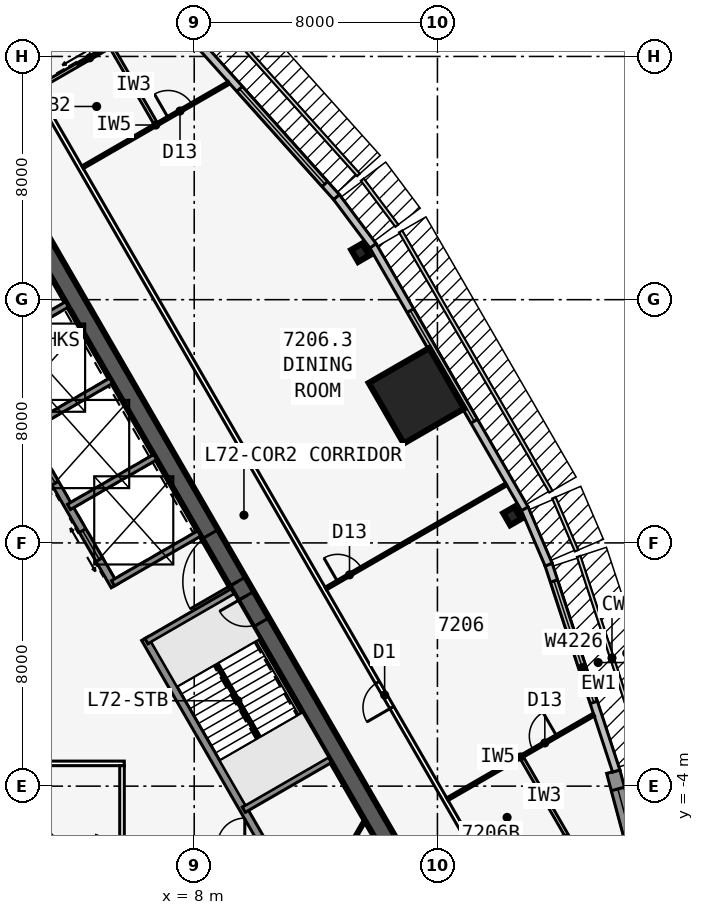
"""IFC4 building model, lengths in metres.
Left out: names, types, materials, properties, quantities, classifications, styles, units other than length and angle.
Written with IfcOpenShell. Run it as: python <this file> out.ifc"""

import sys

from ifc_helpers import new_model, si_unit, direction, frame, frame_2d, origin, origin_2d, place, context, subcontext, project, spatial, rectangle, i_section, extrude, element, fill, save


model = new_model("IFC4")
c1 = context("Model", 3, precision=1e-05, world=origin(), true_north=direction((0.0, 1.0)))
c2 = subcontext(c1, "Body", "Model", "MODEL_VIEW")
j1 = project(units=[si_unit("LENGTHUNIT", "METRE"), si_unit("PLANEANGLEUNIT", "RADIAN")], contexts=[c1])
p1 = place(None, origin())
s1 = spatial("IfcSite", under=j1, at=p1, CompositionType="ELEMENT")
p2 = place(p1, origin())
s2 = spatial("IfcBuilding", under=s1, at=p2, CompositionType="ELEMENT")
p3 = place(p2, frame((0.0, 0.0, 271.7)))
s3 = spatial("IfcBuildingStorey", under=s2, at=p3, CompositionType="ELEMENT", Elevation=271.7)
p4 = place(p3, frame((16.5, -9.526, 0.0), z_axis=(0.0, 0.0, 1.0), x_axis=(-0.499999749417, 0.866025548458, 0.0)))
e1 = element("IfcWall", 1, at=p4, inside=s3, PredefinedType="SHEAR", context=c2, shape_type="SweptSolid", body=[
    extrude(rectangle(XDim=33.0, YDim=0.6, at=frame_2d((16.5, 0.0))), origin(), (0.0, 0.0, 1.0), 3.6),
])
p5 = place(p4, frame((14.15, 0.0, 0.0)))
e2 = element("IfcOpeningElement", 2, at=p5, cuts=e1, PredefinedType="OPENING", context=c2, shape_type="SweptSolid", body=[
    extrude(rectangle(XDim=1.8, YDim=2.13, at=frame_2d((0.9, 1.065))), frame((0.0, 0.31, 0.0), z_axis=(0.0, -1.0, 0.0), x_axis=(1.0, 0.0, 0.0)), (0.0, 0.0, 1.0), 0.62),
])
p6 = place(p4, frame((12.6, 0.0, 0.0)))
e3 = element("IfcOpeningElement", 3, at=p6, cuts=e1, PredefinedType="OPENING", context=c2, shape_type="SweptSolid", body=[
    extrude(rectangle(XDim=1.0, YDim=2.13, at=frame_2d((0.5, 1.065))), frame((0.0, 0.31, 0.0), z_axis=(0.0, -1.0, 0.0), x_axis=(1.0, 0.0, 0.0)), (0.0, 0.0, 1.0), 0.62),
])
p7 = place(p3, frame((10.245, -5.843, 0.0), z_axis=(0.0, 0.0, 1.0), x_axis=(-0.499993009313, 0.866029439822, 0.0)))
e4 = element("IfcWall", 4, at=p7, inside=s3, PredefinedType="SOLIDWALL", context=c2, shape_type="SweptSolid", body=[
    extrude(rectangle(XDim=7.733, YDim=0.25, at=frame_2d((3.866, 0.0))), origin(), (0.0, 0.0, 1.0), 3.35),
])
p8 = place(p3, frame((5.379, 2.586, 0.0), z_axis=(0.0, 0.0, 1.0), x_axis=(-0.500001375892, 0.866024609411, 0.0)))
e5 = element("IfcWall", 5, at=p8, inside=s3, PredefinedType="SOLIDWALL", context=c2, shape_type="SweptSolid", body=[
    extrude(rectangle(XDim=10.633, YDim=0.25, at=frame_2d((5.316, 0.0))), origin(), (0.0, 0.0, 1.0), 3.35),
])
p9 = place(p8, frame((9.164, 0.0, 0.0)))
e6 = element("IfcOpeningElement", 6, at=p9, cuts=e5, PredefinedType="OPENING", context=c2, shape_type="SweptSolid", body=[
    extrude(rectangle(XDim=0.9, YDim=2.13, at=frame_2d((0.45, 1.065))), frame((0.0, 0.135, 0.0), z_axis=(0.0, -1.0, 0.0), x_axis=(1.0, 0.0, 0.0)), (0.0, 0.0, 1.0), 0.27),
])
p10 = place(p8, frame((1.0, 0.0, 0.0)))
e7 = element("IfcOpeningElement", 7, at=p10, cuts=e5, PredefinedType="OPENING", context=c2, shape_type="SweptSolid", body=[
    extrude(rectangle(XDim=1.1, YDim=2.13, at=frame_2d((0.55, 1.065))), frame((0.0, 0.135, 0.0), z_axis=(0.0, -1.0, 0.0), x_axis=(1.0, 0.0, 0.0)), (0.0, 0.0, 1.0), 0.27),
])
p11 = place(p8, frame((3.9, 0.0, 0.0)))
e8 = element("IfcOpeningElement", 8, at=p11, cuts=e5, PredefinedType="OPENING", context=c2, shape_type="SweptSolid", body=[
    extrude(rectangle(XDim=1.1, YDim=2.13, at=frame_2d((0.55, 1.065))), frame((0.0, 0.135, 0.0), z_axis=(0.0, -1.0, 0.0), x_axis=(1.0, 0.0, 0.0)), (0.0, 0.0, 1.0), 0.27),
])
p12 = place(p8, frame((6.8, 0.0, 0.0)))
e9 = element("IfcOpeningElement", 9, at=p12, cuts=e5, PredefinedType="OPENING", context=c2, shape_type="SweptSolid", body=[
    extrude(rectangle(XDim=1.1, YDim=2.13, at=frame_2d((0.55, 1.065))), frame((0.0, 0.135, 0.0), z_axis=(0.0, -1.0, 0.0), x_axis=(1.0, 0.0, 0.0)), (0.0, 0.0, 1.0), 0.27),
])
p13 = place(p3, frame((9.629, -4.775, 0.0), z_axis=(0.0, 0.0, 1.0), x_axis=(0.865995643347, 0.500051543047, 0.0)))
e10 = element("IfcWall", 10, at=p13, inside=s3, PredefinedType="SOLIDWALL", context=c2, shape_type="SweptSolid", body=[
    extrude(rectangle(XDim=3.275, YDim=0.2, at=frame_2d((1.638, 0.0))), origin(), (0.0, 0.0, 1.0), 3.35),
])
for number, where, z_axis, x_axis in (
    (11, (6.429, 0.767, 0.0), (0.0, 0.0, 1.0), (0.866, 0.5, 0.0)),
    (12, (5.329, 2.673, 0.0), (0.0, 0.0, 1.0), (0.866, 0.5, 0.0)),
    (13, (3.879, 5.184, 0.0), (0.0, 0.0, 1.0), (0.866, 0.5, 0.0)),
    (14, (2.429, 7.696, 0.0), (0.0, 0.0, 1.0), (0.866, 0.5, 0.0)),
    (15, (0.979, 10.207, 0.0), (0.0, 0.0, 1.0), (0.866, 0.5, 0.0)),
):
    element("IfcWall", number, at=place(p3, frame(where, z_axis=z_axis, x_axis=x_axis)), inside=s3, PredefinedType="SOLIDWALL", context=c2, shape_type="SweptSolid", body=[
        extrude(rectangle(XDim=3.275, YDim=0.2, at=frame_2d((1.637, 0.0))), origin(), (0.0, 0.0, 1.0), 3.35),
    ])
for number, where, z_axis, x_axis in (
    (16, (18.461, 4.885, 0.0), (0.0, 0.0, 1.0), (0.866, 0.5, 0.0)),
    (17, (13.461, 13.545, 0.0), (0.0, 0.0, 1.0), (0.866, 0.5, 0.0)),
):
    element("IfcColumn", number, at=place(p3, frame(where, z_axis=z_axis, x_axis=x_axis)), inside=s3, PredefinedType="COLUMN", context=c2, shape_type="SweptSolid", body=[
        extrude(i_section(OverallWidth=0.419, OverallDepth=0.455, WebThickness=0.042, FlangeThickness=0.068, at=origin_2d()), origin(), (0.0, 0.0, 1.0), 3.6),
    ])
p14 = place(p3, frame((15.312, 8.84, 0.0), z_axis=(0.0, 0.0, 1.0), x_axis=(0.866025403784, 0.5, 0.0)))
e18 = element("IfcColumn", 18, at=p14, inside=s3, PredefinedType="COLUMN", context=c2, shape_type="SweptSolid", body=[
    extrude(rectangle(XDim=2.3, YDim=2.3, at=origin_2d()), origin(), (0.0, 0.0, 1.0), 3.6),
])
p15 = place(p3, frame((23.02, -8.141, 0.0), z_axis=(0.0, 0.0, 1.0), x_axis=(-0.25880328844, 0.965930048136, 0.0)))
e19 = element("IfcWall", 19, at=p15, inside=s3, PredefinedType="SOLIDWALL", context=c2, shape_type="SweptSolid", body=[
    extrude(rectangle(XDim=4.782, YDim=0.45, at=frame_2d((2.391, 0.0))), origin(), (0.0, 0.0, 1.0), 3.35),
])
p16 = place(p15, frame((0.591, 0.0, 0.45)))
e20 = element("IfcOpeningElement", 20, at=p16, cuts=e19, PredefinedType="OPENING", context=c2, shape_type="SweptSolid", body=[
    extrude(rectangle(XDim=3.6, YDim=2.6, at=frame_2d((1.8, 1.3))), frame((0.0, 0.235, 0.0), z_axis=(0.0, -1.0, 0.0), x_axis=(1.0, 0.0, 0.0)), (0.0, 0.0, 1.0), 0.47),
])
p17 = place(p3, frame((21.881, -3.503, 0.0), z_axis=(0.0, 0.0, 1.0), x_axis=(-0.311328857048, 0.95030223759, 0.0)))
e21 = element("IfcWall", 21, at=p17, inside=s3, PredefinedType="STANDARD", context=c2, shape_type="SweptSolid", body=[
    extrude(rectangle(XDim=7.153, YDim=0.25, at=frame_2d((3.576, 0.0))), origin(), (0.0, 0.0, 1.0), 3.35),
])
p18 = place(p17, frame((2.376, 0.0, 0.45)))
e22 = element("IfcOpeningElement", 22, at=p18, cuts=e21, PredefinedType="OPENING", context=c2, shape_type="SweptSolid", body=[
    extrude(rectangle(XDim=4.2, YDim=2.6, at=frame_2d((2.1, 1.3))), frame((0.0, 0.135, 0.0), z_axis=(0.0, -1.0, 0.0), x_axis=(1.0, 0.0, 0.0)), (0.0, 0.0, 1.0), 0.27),
])
p19 = place(p3, frame((19.658, 3.284, 0.0), z_axis=(0.0, 0.0, 1.0), x_axis=(-0.393290226175, 0.91941437774, 0.0)))
e23 = element("IfcWall", 23, at=p19, inside=s3, PredefinedType="STANDARD", context=c2, shape_type="SweptSolid", body=[
    extrude(rectangle(XDim=2.014, YDim=0.25, at=frame_2d((1.007, 0.0))), origin(), (0.0, 0.0, 1.0), 3.35),
])
p20 = place(p3, frame((18.873, 5.123, 0.0), z_axis=(0.0, 0.0, 1.0), x_axis=(-0.499993662806, 0.866029062534, 0.0)))
e24 = element("IfcWall", 24, at=p20, inside=s3, PredefinedType="STANDARD", context=c2, shape_type="SweptSolid", body=[
    extrude(rectangle(XDim=10.0, YDim=0.25, at=frame_2d((5.0, 0.0))), origin(), (0.0, 0.0, 1.0), 3.35),
])
p21 = place(p20, frame((3.325, 0.0, 0.45)))
e25 = element("IfcOpeningElement", 25, at=p21, cuts=e24, PredefinedType="OPENING", context=c2, shape_type="SweptSolid", body=[
    extrude(rectangle(XDim=4.2, YDim=2.6, at=frame_2d((2.1, 1.3))), frame((0.0, 0.135, 0.0), z_axis=(0.0, -1.0, 0.0), x_axis=(1.0, 0.0, 0.0)), (0.0, 0.0, 1.0), 0.27),
])
p22 = place(p3, frame((13.881, 13.771, 0.0), z_axis=(0.0, 0.0, 1.0), x_axis=(-0.599650843534, 0.800261748335, 0.0)))
e26 = element("IfcWall", 26, at=p22, inside=s3, PredefinedType="STANDARD", context=c2, shape_type="SweptSolid", body=[
    extrude(rectangle(XDim=2.014, YDim=0.25, at=frame_2d((1.007, 0.0))), origin(), (0.0, 0.0, 1.0), 3.35),
])
p23 = place(p3, frame((12.68, 15.374, 0.0), z_axis=(0.0, 0.0, 1.0), x_axis=(-0.667303550892, 0.744785855778, 0.0)))
e27 = element("IfcWall", 27, at=p23, inside=s3, PredefinedType="STANDARD", context=c2, shape_type="SweptSolid", body=[
    extrude(rectangle(XDim=7.153, YDim=0.25, at=frame_2d((3.576, 0.0))), origin(), (0.0, 0.0, 1.0), 3.35),
])
p24 = place(p23, frame((0.577, 0.0, 0.45)))
e28 = element("IfcOpeningElement", 28, at=p24, cuts=e27, PredefinedType="OPENING", context=c2, shape_type="SweptSolid", body=[
    extrude(rectangle(XDim=4.2, YDim=2.6, at=frame_2d((2.1, 1.3))), frame((0.0, 0.135, 0.0), z_axis=(0.0, -1.0, 0.0), x_axis=(1.0, 0.0, 0.0)), (0.0, 0.0, 1.0), 0.27),
])
p25 = place(p3, frame((20.177, -11.245, 0.0), z_axis=(0.0, 0.0, 1.0), x_axis=(-0.499998875317, 0.866026053119, 0.0)))
e29 = element("IfcWall", 29, at=p25, inside=s3, PredefinedType="PARTITIONING", context=c2, shape_type="SweptSolid", body=[
    extrude(rectangle(XDim=39.654, YDim=0.15, at=frame_2d((19.827, 0.0))), origin(), (0.0, 0.0, 1.0), 3.35),
])
p26 = place(p25, frame((11.352, 0.0, 0.0)))
e30 = element("IfcOpeningElement", 30, at=p26, cuts=e29, PredefinedType="OPENING", context=c2, shape_type="SweptSolid", body=[
    extrude(rectangle(XDim=0.95, YDim=2.13, at=frame_2d((0.475, 1.065))), frame((0.0, 0.085, 0.0), z_axis=(0.0, -1.0, 0.0), x_axis=(1.0, 0.0, 0.0)), (0.0, 0.0, 1.0), 0.17),
])
p27 = place(p3, frame((16.329, -4.429, 0.0), z_axis=(0.0, 0.0, 1.0), x_axis=(0.866029066823, 0.499993655377, 0.0)))
e31 = element("IfcWall", 31, at=p27, inside=s3, PredefinedType="PARTITIONING", context=c2, shape_type="SweptSolid", body=[
    extrude(rectangle(XDim=5.559, YDim=0.1, at=frame_2d((2.779, 0.0))), origin(), (0.0, 0.0, 1.0), 2.301),
])
p28 = place(p27, frame((3.25, 0.0, 0.0)))
e32 = element("IfcOpeningElement", 32, at=p28, cuts=e31, PredefinedType="OPENING", context=c2, shape_type="SweptSolid", body=[
    extrude(rectangle(XDim=0.9, YDim=2.13, at=frame_2d((0.45, 1.065))), frame((0.0, 0.06, 0.0), z_axis=(0.0, -1.0, 0.0), x_axis=(1.0, 0.0, 0.0)), (0.0, 0.0, 1.0), 0.12),
])
p29 = place(p3, frame((12.329, 2.499, 0.0), z_axis=(0.0, 0.0, 1.0), x_axis=(0.866027209835, 0.499996871816, 0.0)))
e33 = element("IfcWall", 33, at=p29, inside=s3, PredefinedType="PARTITIONING", context=c2, shape_type="SweptSolid", body=[
    extrude(rectangle(XDim=6.854, YDim=0.1, at=frame_2d((3.427, 0.0))), origin(), (0.0, 0.0, 1.0), 3.35),
])
p30 = place(p29, frame((0.45, 0.0, 0.0)))
e34 = element("IfcOpeningElement", 34, at=p30, cuts=e33, PredefinedType="OPENING", context=c2, shape_type="SweptSolid", body=[
    extrude(rectangle(XDim=0.9, YDim=2.13, at=frame_2d((0.45, 1.065))), frame((0.0, 0.06, 0.0), z_axis=(0.0, -1.0, 0.0), x_axis=(1.0, 0.0, 0.0)), (0.0, 0.0, 1.0), 0.12),
])
p31 = place(p3, frame((4.329, 16.355, 0.0), z_axis=(0.0, 0.0, 1.0), x_axis=(0.866029066823, 0.499993655377, 0.0)))
e35 = element("IfcWall", 35, at=p31, inside=s3, PredefinedType="PARTITIONING", context=c2, shape_type="SweptSolid", body=[
    extrude(rectangle(XDim=5.559, YDim=0.1, at=frame_2d((2.779, 0.0))), origin(), (0.0, 0.0, 1.0), 2.301),
])
p32 = place(p31, frame((3.25, 0.0, 0.0)))
e36 = element("IfcOpeningElement", 36, at=p32, cuts=e35, PredefinedType="OPENING", context=c2, shape_type="SweptSolid", body=[
    extrude(rectangle(XDim=0.9, YDim=2.13, at=frame_2d((0.45, 1.065))), frame((0.0, 0.06, 0.0), z_axis=(0.0, -1.0, 0.0), x_axis=(1.0, 0.0, 0.0)), (0.0, 0.0, 1.0), 0.12),
])
p33 = place(p3, frame((20.253, -5.627, 0.0), z_axis=(0.0, 0.0, 1.0), x_axis=(-0.50002537861, 0.866010750942, 0.0)))
e37 = element("IfcWall", 37, at=p33, inside=s3, PredefinedType="PLUMBINGWALL", context=c2, shape_type="SweptSolid", body=[
    extrude(rectangle(XDim=3.0, YDim=0.12, at=frame_2d((1.5, 0.0))), origin(), (0.0, 0.0, 1.0), 3.35),
])
p34 = place(p3, frame((17.829, -7.027, 0.0), z_axis=(0.0, 0.0, 1.0), x_axis=(0.866035715982, 0.499982138324, 0.0)))
e38 = element("IfcWall", 38, at=p34, inside=s3, PredefinedType="PLUMBINGWALL", context=c2, shape_type="SweptSolid", body=[
    extrude(rectangle(XDim=2.74, YDim=0.12, at=frame_2d((1.37, 0.0))), origin(), (0.0, 0.0, 1.0), 3.35),
])
p35 = place(p34, frame((1.55, 0.0, 0.0)))
e39 = element("IfcOpeningElement", 39, at=p35, cuts=e38, PredefinedType="OPENING", context=c2, shape_type="SweptSolid", body=[
    extrude(rectangle(XDim=0.9, YDim=2.13, at=frame_2d((0.45, 1.065))), frame((0.0, 0.07, 0.0), z_axis=(0.0, -1.0, 0.0), x_axis=(1.0, 0.0, 0.0)), (0.0, 0.0, 1.0), 0.14),
])
p36 = place(p3, frame((6.753, 17.755, 0.0), z_axis=(0.0, 0.0, 1.0), x_axis=(-0.499990139034, 0.866031096941, 0.0)))
e40 = element("IfcWall", 40, at=p36, inside=s3, PredefinedType="PLUMBINGWALL", context=c2, shape_type="SweptSolid", body=[
    extrude(rectangle(XDim=3.0, YDim=0.12, at=frame_2d((1.5, 0.0))), origin(), (0.0, 0.0, 1.0), 3.35),
])
p37 = place(p3, frame((2.829, 18.954, 0.0), z_axis=(0.0, 0.0, 1.0), x_axis=(0.866035715982, 0.499982138324, 0.0)))
e41 = element("IfcWall", 41, at=p37, inside=s3, PredefinedType="PLUMBINGWALL", context=c2, shape_type="SweptSolid", body=[
    extrude(rectangle(XDim=2.74, YDim=0.12, at=frame_2d((1.37, 0.0))), origin(), (0.0, 0.0, 1.0), 3.35),
])
p38 = place(p37, frame((1.55, 0.0, 0.0)))
e42 = element("IfcOpeningElement", 42, at=p38, cuts=e41, PredefinedType="OPENING", context=c2, shape_type="SweptSolid", body=[
    extrude(rectangle(XDim=0.9, YDim=2.13, at=frame_2d((0.45, 1.065))), frame((0.0, 0.07, 0.0), z_axis=(0.0, -1.0, 0.0), x_axis=(1.0, 0.0, 0.0)), (0.0, 0.0, 1.0), 0.14),
])
p39 = place(p3, frame((-2.65, -3.251, 0.0), z_axis=(0.0, 0.0, 1.0), x_axis=(1.0, 0.0, 0.0)))
e43 = element("IfcWall", 43, at=p39, inside=s3, PredefinedType="PARTITIONING", context=c2, shape_type="SweptSolid", body=[
    extrude(rectangle(XDim=8.35, YDim=0.15, at=frame_2d((4.175, 0.0))), origin(), (0.0, 0.0, 1.0), 3.35),
])
p40 = place(p3, frame((5.625, -5.826, 0.0), z_axis=(0.0, 0.0, 1.0), x_axis=(0.0, 1.0, 0.0)))
e44 = element("IfcWall", 44, at=p40, inside=s3, PredefinedType="PARTITIONING", context=c2, shape_type="SweptSolid", body=[
    extrude(rectangle(XDim=2.5, YDim=0.15, at=frame_2d((1.25, 0.0))), origin(), (0.0, 0.0, 1.0), 3.35),
])
p41 = place(p3, frame((13.613, -5.126, 0.0), z_axis=(0.0, 0.0, 1.0), x_axis=(-0.499999210213, -0.866025859768, 0.0)))
e45 = element("IfcWall", 45, at=p41, inside=s3, PredefinedType="PARTITIONING", context=c2, shape_type="SweptSolid", body=[
    extrude(rectangle(XDim=4.734, YDim=0.1, at=frame_2d((2.367, 0.0))), origin(), (0.0, 0.0, 1.0), 3.35),
])
p42 = place(p41, frame((1.917, 0.0, 0.0)))
e46 = element("IfcOpeningElement", 46, at=p42, cuts=e45, PredefinedType="OPENING", context=c2, shape_type="SweptSolid", body=[
    extrude(rectangle(XDim=0.9, YDim=2.13, at=frame_2d((0.45, 1.065))), frame((0.0, 0.06, 0.0), z_axis=(0.0, -1.0, 0.0), x_axis=(1.0, 0.0, 0.0)), (0.0, 0.0, 1.0), 0.12),
])
p43 = place(p3, frame((10.135, -2.401, 0.0), z_axis=(0.0, 0.0, 1.0), x_axis=(-0.499992232847, 0.866029888106, 0.0)))
e47 = element("IfcWall", 47, at=p43, inside=s3, PredefinedType="SOLIDWALL", context=c2, shape_type="SweptSolid", body=[
    extrude(rectangle(XDim=2.794, YDim=0.1, at=frame_2d((1.397, 0.0))), origin(), (0.0, 0.0, 1.0), 3.6),
])
p44 = place(p16, origin())
e48 = element("IfcWindow", 48, at=p44, inside=s3, PartitioningType="SINGLE_PANEL", PredefinedType="WINDOW", context=c2, shape_type="SweptSolid", body=[
    extrude(rectangle(XDim=3.6, YDim=2.6, at=frame_2d((1.8, 1.3))), frame((0.0, 0.03, 0.0), z_axis=(0.0, -1.0, 0.0), x_axis=(1.0, 0.0, 0.0)), (0.0, 0.0, 1.0), 0.06),
])
fill(e20, e48)
p45 = place(p18, origin())
e49 = element("IfcWindow", 49, at=p45, inside=s3, PartitioningType="SINGLE_PANEL", PredefinedType="WINDOW", context=c2, shape_type="SweptSolid", body=[
    extrude(rectangle(XDim=4.2, YDim=2.6, at=frame_2d((2.1, 1.3))), frame((0.0, 0.03, 0.0), z_axis=(0.0, -1.0, 0.0), x_axis=(1.0, 0.0, 0.0)), (0.0, 0.0, 1.0), 0.06),
])
fill(e22, e49)
p46 = place(p21, origin())
e50 = element("IfcWindow", 50, at=p46, inside=s3, PartitioningType="SINGLE_PANEL", PredefinedType="WINDOW", context=c2, shape_type="SweptSolid", body=[
    extrude(rectangle(XDim=4.2, YDim=2.6, at=frame_2d((2.1, 1.3))), frame((0.0, 0.03, 0.0), z_axis=(0.0, -1.0, 0.0), x_axis=(1.0, 0.0, 0.0)), (0.0, 0.0, 1.0), 0.06),
])
fill(e25, e50)
p47 = place(p24, origin())
e51 = element("IfcWindow", 51, at=p47, inside=s3, PartitioningType="SINGLE_PANEL", PredefinedType="WINDOW", context=c2, shape_type="SweptSolid", body=[
    extrude(rectangle(XDim=4.2, YDim=2.6, at=frame_2d((2.1, 1.3))), frame((0.0, 0.03, 0.0), z_axis=(0.0, -1.0, 0.0), x_axis=(1.0, 0.0, 0.0)), (0.0, 0.0, 1.0), 0.06),
])
fill(e28, e51)
p48 = place(p28, origin())
e52 = element("IfcDoor", 52, at=p48, inside=s3, OperationType="SINGLE_SWING_RIGHT", PredefinedType="DOOR", context=c2, shape_type="SweptSolid", body=[
    extrude(rectangle(XDim=0.9, YDim=2.13, at=frame_2d((0.45, 1.065))), frame((0.0, 0.025, 0.0), z_axis=(0.0, -1.0, 0.0), x_axis=(1.0, 0.0, 0.0)), (0.0, 0.0, 1.0), 0.05),
])
fill(e32, e52)
p49 = place(p30, origin())
e53 = element("IfcDoor", 53, at=p49, inside=s3, OperationType="SINGLE_SWING_LEFT", PredefinedType="DOOR", context=c2, shape_type="SweptSolid", body=[
    extrude(rectangle(XDim=0.9, YDim=2.13, at=frame_2d((0.45, 1.065))), frame((0.0, 0.025, 0.0), z_axis=(0.0, -1.0, 0.0), x_axis=(1.0, 0.0, 0.0)), (0.0, 0.0, 1.0), 0.05),
])
fill(e34, e53)
p50 = place(p32, origin())
e54 = element("IfcDoor", 54, at=p50, inside=s3, OperationType="SINGLE_SWING_LEFT", PredefinedType="DOOR", context=c2, shape_type="SweptSolid", body=[
    extrude(rectangle(XDim=0.9, YDim=2.13, at=frame_2d((0.45, 1.065))), frame((0.0, 0.025, 0.0), z_axis=(0.0, -1.0, 0.0), x_axis=(1.0, 0.0, 0.0)), (0.0, 0.0, 1.0), 0.05),
])
fill(e36, e54)
p51 = place(p26, origin())
e55 = element("IfcDoor", 55, at=p51, inside=s3, OperationType="SINGLE_SWING_LEFT", PredefinedType="DOOR", context=c2, shape_type="SweptSolid", body=[
    extrude(rectangle(XDim=0.95, YDim=2.13, at=frame_2d((0.475, 1.065))), frame((0.0, 0.025, 0.0), z_axis=(0.0, -1.0, 0.0), x_axis=(1.0, 0.0, 0.0)), (0.0, 0.0, 1.0), 0.05),
])
fill(e30, e55)
p52 = place(p38, origin())
e56 = element("IfcDoor", 56, at=p52, inside=s3, OperationType="SLIDING_TO_LEFT", PredefinedType="DOOR", context=c2, shape_type="SweptSolid", body=[
    extrude(rectangle(XDim=0.9, YDim=2.13, at=frame_2d((0.45, 1.065))), frame((0.0, 0.025, 0.0), z_axis=(0.0, -1.0, 0.0), x_axis=(1.0, 0.0, 0.0)), (0.0, 0.0, 1.0), 0.05),
])
fill(e42, e56)
p53 = place(p5, origin())
e57 = element("IfcDoor", 57, at=p53, inside=s3, OperationType="DOUBLE_DOOR_SINGLE_SWING", PredefinedType="DOOR", context=c2, shape_type="SweptSolid", body=[
    extrude(rectangle(XDim=1.8, YDim=2.13, at=frame_2d((0.9, 1.065))), frame((0.0, 0.025, 0.0), z_axis=(0.0, -1.0, 0.0), x_axis=(1.0, 0.0, 0.0)), (0.0, 0.0, 1.0), 0.05),
])
fill(e2, e57)
p54 = place(p6, origin())
e58 = element("IfcDoor", 58, at=p54, inside=s3, OperationType="SINGLE_SWING_RIGHT", PredefinedType="DOOR", context=c2, shape_type="SweptSolid", body=[
    extrude(rectangle(XDim=1.0, YDim=2.13, at=frame_2d((0.5, 1.065))), frame((0.0, 0.025, 0.0), z_axis=(0.0, -1.0, 0.0), x_axis=(1.0, 0.0, 0.0)), (0.0, 0.0, 1.0), 0.05),
])
fill(e3, e58)
p55 = place(p10, origin())
e59 = element("IfcDoor", 59, at=p55, inside=s3, OperationType="DOUBLE_DOOR_SLIDING", PredefinedType="USERDEFINED", context=c2, shape_type="SweptSolid", body=[
    extrude(rectangle(XDim=1.1, YDim=2.13, at=frame_2d((0.55, 1.065))), frame((0.0, 0.025, 0.0), z_axis=(0.0, -1.0, 0.0), x_axis=(1.0, 0.0, 0.0)), (0.0, 0.0, 1.0), 0.05),
])
fill(e7, e59)
p56 = place(p11, origin())
e60 = element("IfcDoor", 60, at=p56, inside=s3, OperationType="DOUBLE_DOOR_SLIDING", PredefinedType="USERDEFINED", context=c2, shape_type="SweptSolid", body=[
    extrude(rectangle(XDim=1.1, YDim=2.13, at=frame_2d((0.55, 1.065))), frame((0.0, 0.025, 0.0), z_axis=(0.0, -1.0, 0.0), x_axis=(1.0, 0.0, 0.0)), (0.0, 0.0, 1.0), 0.05),
])
fill(e8, e60)
save(model, sys.argv[1])
